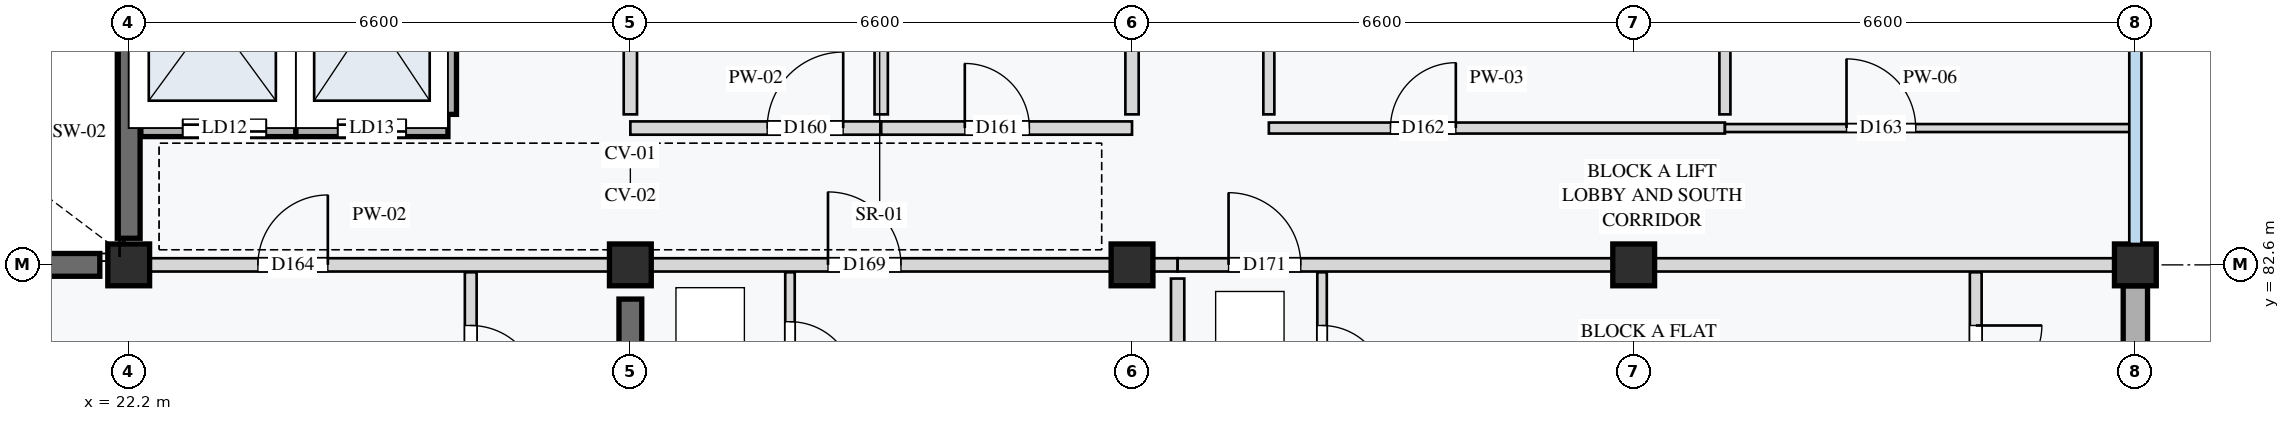
"""IFC4 building model, lengths in metres.
Left out: names, types, materials, properties, quantities, classifications, styles, units other than length and angle.
Written with IfcOpenShell. Run it as: python <this file> out.ifc"""

import sys

from ifc_helpers import new_model, si_unit, direction, frame, frame_2d, origin, origin_2d, place, context, subcontext, project, spatial, rectangle, extrude, element, fill, save


model = new_model("IFC4")
c1 = context("Model", 3, precision=1e-05, world=origin(), true_north=direction((0.0, 1.0)))
c2 = subcontext(c1, "Body", "Model", "MODEL_VIEW")
j1 = project(units=[si_unit("LENGTHUNIT", "METRE"), si_unit("PLANEANGLEUNIT", "RADIAN")], contexts=[c1])
p1 = place(None, origin())
s1 = spatial("IfcSite", under=j1, at=p1, CompositionType="ELEMENT")
p2 = place(p1, origin())
s2 = spatial("IfcBuilding", under=s1, at=p2, CompositionType="ELEMENT")
p3 = place(p2, frame((0.0, 0.0, 18.0)))
s3 = spatial("IfcBuildingStorey", under=s2, at=p3, CompositionType="ELEMENT", Elevation=18.0)
for number, where, z_axis, x_axis in (
    (1, (22.2, 82.6, 0.0), (0.0, 0.0, 1.0), (1.0, 0.0, 0.0)),
    (2, (28.8, 82.6, 0.0), (0.0, 0.0, 1.0), (1.0, 0.0, 0.0)),
    (3, (35.4, 82.6, 0.0), (0.0, 0.0, 1.0), (1.0, 0.0, 0.0)),
    (4, (42.0, 82.6, 0.0), (0.0, 0.0, 1.0), (1.0, 0.0, 0.0)),
    (5, (48.6, 82.6, 0.0), (0.0, 0.0, 1.0), (1.0, 0.0, 0.0)),
):
    element("IfcColumn", number, at=place(p3, frame(where, z_axis=z_axis, x_axis=x_axis)), inside=s3, PredefinedType="COLUMN", context=c2, shape_type="SweptSolid", body=[
        extrude(rectangle(XDim=0.55, YDim=0.55, at=origin_2d()), origin(), (0.0, 0.0, 1.0), 3.2),
    ])
p4 = place(p3, frame((15.98, 82.6, 0.0), z_axis=(0.0, 0.0, 1.0), x_axis=(1.0, 0.0, 0.0)))
e6 = element("IfcWall", 6, at=p4, inside=s3, PredefinedType="SHEAR", context=c2, shape_type="SweptSolid", body=[
    extrude(rectangle(XDim=5.84, YDim=0.3, at=frame_2d((2.92, 0.0))), origin(), (0.0, 0.0, 1.0), 2.96),
])
p5 = place(p3, frame((22.2, 82.95, 0.0), z_axis=(0.0, 0.0, 1.0), x_axis=(0.0, 1.0, 0.0)))
e7 = element("IfcWall", 7, at=p5, inside=s3, PredefinedType="SHEAR", context=c2, shape_type="SweptSolid", body=[
    extrude(rectangle(XDim=2.8, YDim=0.3, at=frame_2d((1.4, 0.0))), origin(), (0.0, 0.0, 1.0), 2.96),
])
p6 = place(p3, frame((28.8, 76.45, 0.0), z_axis=(0.0, 0.0, 1.0), x_axis=(0.0, 1.0, 0.0)))
e8 = element("IfcWall", 8, at=p6, inside=s3, PredefinedType="SHEAR", context=c2, shape_type="SweptSolid", body=[
    extrude(rectangle(XDim=5.7, YDim=0.3, at=frame_2d((2.85, 0.0))), origin(), (0.0, 0.0, 1.0), 2.96),
])
p7 = place(p3, frame((48.6, 76.275, 0.0), z_axis=(0.0, 0.0, 1.0), x_axis=(0.0, 1.0, 0.0)))
e9 = element("IfcWall", 9, at=p7, inside=s3, PredefinedType="STANDARD", context=c2, shape_type="SweptSolid", body=[
    extrude(rectangle(XDim=6.05, YDim=0.32, at=frame_2d((3.025, 0.0))), origin(), (0.0, 0.0, 1.0), 2.65),
])
p8 = place(p3, frame((22.36, 84.4, 0.0), z_axis=(0.0, 0.0, 1.0), x_axis=(1.0, 0.0, 0.0)))
e10 = element("IfcWall", 10, at=p8, inside=s3, PredefinedType="STANDARD", context=c2, shape_type="SweptSolid", body=[
    extrude(rectangle(XDim=2.04, YDim=0.225, at=frame_2d((1.02, 0.0))), origin(), (0.0, 0.0, 1.0), 2.96),
])
p9 = place(p8, frame((0.55, 0.0, 0.0)))
e11 = element("IfcOpeningElement", 11, at=p9, cuts=e10, PredefinedType="OPENING", context=c2, shape_type="SweptSolid", body=[
    extrude(rectangle(XDim=1.1, YDim=2.1, at=frame_2d((0.55, 1.05))), frame((0.0, 0.123, 0.0), z_axis=(0.0, -1.0, 0.0), x_axis=(1.0, 0.0, 0.0)), (0.0, 0.0, 1.0), 0.245),
])
p10 = place(p3, frame((24.4, 84.4, 0.0), z_axis=(0.0, 0.0, 1.0), x_axis=(1.0, 0.0, 0.0)))
e12 = element("IfcWall", 12, at=p10, inside=s3, PredefinedType="STANDARD", context=c2, shape_type="SweptSolid", body=[
    extrude(rectangle(XDim=2.0, YDim=0.225, at=frame_2d((1.0, 0.0))), origin(), (0.0, 0.0, 1.0), 2.96),
])
p11 = place(p10, frame((0.55, 0.0, 0.0)))
e13 = element("IfcOpeningElement", 13, at=p11, cuts=e12, PredefinedType="OPENING", context=c2, shape_type="SweptSolid", body=[
    extrude(rectangle(XDim=0.9, YDim=2.1, at=frame_2d((0.45, 1.05))), frame((0.0, 0.123, 0.0), z_axis=(0.0, -1.0, 0.0), x_axis=(1.0, 0.0, 0.0)), (0.0, 0.0, 1.0), 0.245),
])
for number, where, z_axis, x_axis in (
    (14, (24.4, 84.58, 0.0), (0.0, 0.0, 1.0), (0.0, 1.0, 0.0)),
    (15, (26.4, 84.58, 0.0), (0.0, 0.0, 1.0), (0.0, 1.0, 0.0)),
):
    element("IfcWall", number, at=place(p3, frame(where, z_axis=z_axis, x_axis=x_axis)), inside=s3, PredefinedType="STANDARD", context=c2, shape_type="SweptSolid", body=[
        extrude(rectangle(XDim=2.64, YDim=0.225, at=frame_2d((1.32, 0.0))), origin(), (0.0, 0.0, 1.0), 2.96),
    ])
p12 = place(p3, frame((28.8, 84.4, 0.0), z_axis=(0.0, 0.0, 1.0), x_axis=(1.0, 0.0, 0.0)))
e16 = element("IfcWall", 16, at=p12, inside=s3, PredefinedType="PARTITIONING", context=c2, shape_type="SweptSolid", body=[
    extrude(rectangle(XDim=3.3, YDim=0.175, at=frame_2d((1.65, 0.0))), origin(), (0.0, 0.0, 1.0), 2.96),
])
p13 = place(p12, frame((1.8, 0.0, 0.0)))
e17 = element("IfcOpeningElement", 17, at=p13, cuts=e16, PredefinedType="OPENING", context=c2, shape_type="SweptSolid", body=[
    extrude(rectangle(XDim=1.0, YDim=2.16, at=frame_2d((0.5, 1.08))), frame((0.0, 0.097, 0.0), z_axis=(0.0, -1.0, 0.0), x_axis=(1.0, 0.0, 0.0)), (0.0, 0.0, 1.0), 0.195),
])
p14 = place(p3, frame((32.1, 84.4, 0.0), z_axis=(0.0, 0.0, 1.0), x_axis=(1.0, 0.0, 0.0)))
e18 = element("IfcWall", 18, at=p14, inside=s3, PredefinedType="PARTITIONING", context=c2, shape_type="SweptSolid", body=[
    extrude(rectangle(XDim=3.3, YDim=0.175, at=frame_2d((1.65, 0.0))), origin(), (0.0, 0.0, 1.0), 2.96),
])
p15 = place(p14, frame((1.1, 0.0, 0.0)))
e19 = element("IfcOpeningElement", 19, at=p15, cuts=e18, PredefinedType="OPENING", context=c2, shape_type="SweptSolid", body=[
    extrude(rectangle(XDim=0.85, YDim=2.0, at=frame_2d((0.425, 1.0))), frame((0.0, 0.097, 0.0), z_axis=(0.0, -1.0, 0.0), x_axis=(1.0, 0.0, 0.0)), (0.0, 0.0, 1.0), 0.195),
])
for number, where, z_axis, x_axis in (
    (20, (28.8, 84.58, 0.0), (0.0, 0.0, 1.0), (0.0, 1.0, 0.0)),
    (21, (32.1, 84.58, 0.0), (0.0, 0.0, 1.0), (0.0, 1.0, 0.0)),
    (22, (35.4, 84.58, 0.0), (0.0, 0.0, 1.0), (0.0, 1.0, 0.0)),
):
    element("IfcWall", number, at=place(p3, frame(where, z_axis=z_axis, x_axis=x_axis)), inside=s3, PredefinedType="PARTITIONING", context=c2, shape_type="SweptSolid", body=[
        extrude(rectangle(XDim=1.14, YDim=0.175, at=frame_2d((0.57, 0.0))), origin(), (0.0, 0.0, 1.0), 2.96),
    ])
p16 = place(p3, frame((37.2, 84.4, 0.0), z_axis=(0.0, 0.0, 1.0), x_axis=(1.0, 0.0, 0.0)))
e23 = element("IfcWall", 23, at=p16, inside=s3, PredefinedType="PARTITIONING", context=c2, shape_type="SweptSolid", body=[
    extrude(rectangle(XDim=6.0, YDim=0.145, at=frame_2d((3.0, 0.0))), origin(), (0.0, 0.0, 1.0), 2.96),
])
p17 = place(p16, frame((1.6, 0.0, 0.0)))
e24 = element("IfcOpeningElement", 24, at=p17, cuts=e23, PredefinedType="OPENING", context=c2, shape_type="SweptSolid", body=[
    extrude(rectangle(XDim=0.86, YDim=2.12, at=frame_2d((0.43, 1.06))), frame((0.0, 0.083, 0.0), z_axis=(0.0, -1.0, 0.0), x_axis=(1.0, 0.0, 0.0)), (0.0, 0.0, 1.0), 0.165),
])
p18 = place(p3, frame((43.2, 84.4, 0.0), z_axis=(0.0, 0.0, 1.0), x_axis=(1.0, 0.0, 0.0)))
e25 = element("IfcWall", 25, at=p18, inside=s3, PredefinedType="PARTITIONING", context=c2, shape_type="SweptSolid", body=[
    extrude(rectangle(XDim=5.4, YDim=0.105, at=frame_2d((2.7, 0.0))), origin(), (0.0, 0.0, 1.0), 2.96),
])
p19 = place(p18, frame((1.6, 0.0, 0.0)))
e26 = element("IfcOpeningElement", 26, at=p19, cuts=e25, PredefinedType="OPENING", context=c2, shape_type="SweptSolid", body=[
    extrude(rectangle(XDim=0.91, YDim=2.14, at=frame_2d((0.455, 1.07))), frame((0.0, 0.062, 0.0), z_axis=(0.0, -1.0, 0.0), x_axis=(1.0, 0.0, 0.0)), (0.0, 0.0, 1.0), 0.125),
])
for number, where, z_axis, x_axis in (
    (27, (43.2, 84.58, 0.0), (0.0, 0.0, 1.0), (0.0, 1.0, 0.0)),
    (28, (37.2, 84.58, 0.0), (0.0, 0.0, 1.0), (0.0, 1.0, 0.0)),
):
    element("IfcWall", number, at=place(p3, frame(where, z_axis=z_axis, x_axis=x_axis)), inside=s3, PredefinedType="PARTITIONING", context=c2, shape_type="SweptSolid", body=[
        extrude(rectangle(XDim=2.64, YDim=0.145, at=frame_2d((1.32, 0.0))), origin(), (0.0, 0.0, 1.0), 2.96),
    ])
p20 = place(p3, frame((22.2, 82.6, 0.0), z_axis=(0.0, 0.0, 1.0), x_axis=(1.0, 0.0, 0.0)))
e29 = element("IfcWall", 29, at=p20, inside=s3, PredefinedType="PARTITIONING", context=c2, shape_type="SweptSolid", body=[
    extrude(rectangle(XDim=6.6, YDim=0.175, at=frame_2d((3.3, 0.0))), origin(), (0.0, 0.0, 1.0), 2.55),
])
p21 = place(p20, frame((1.7, 0.0, 0.0)))
e30 = element("IfcOpeningElement", 30, at=p21, cuts=e29, PredefinedType="OPENING", context=c2, shape_type="SweptSolid", body=[
    extrude(rectangle(XDim=0.92, YDim=2.14, at=frame_2d((0.46, 1.07))), frame((0.0, 0.097, 0.0), z_axis=(0.0, -1.0, 0.0), x_axis=(1.0, 0.0, 0.0)), (0.0, 0.0, 1.0), 0.195),
])
p22 = place(p3, frame((26.7, 82.502, 0.0), z_axis=(0.0, 0.0, 1.0), x_axis=(0.0, -1.0, 0.0)))
e31 = element("IfcWall", 31, at=p22, inside=s3, PredefinedType="PARTITIONING", context=c2, shape_type="SweptSolid", body=[
    extrude(rectangle(XDim=2.302, YDim=0.155, at=frame_2d((1.151, 0.0))), origin(), (0.0, 0.0, 1.0), 2.96),
])
p23 = place(p22, frame((0.7, 0.0, 0.0)))
e32 = element("IfcOpeningElement", 32, at=p23, cuts=e31, PredefinedType="OPENING", context=c2, shape_type="SweptSolid", body=[
    extrude(rectangle(XDim=0.9, YDim=2.1, at=frame_2d((0.45, 1.05))), frame((0.0, 0.087, 0.0), z_axis=(0.0, -1.0, 0.0), x_axis=(1.0, 0.0, 0.0)), (0.0, 0.0, 1.0), 0.175),
])
p24 = place(p3, frame((28.8, 82.6, 0.0), z_axis=(0.0, 0.0, 1.0), x_axis=(1.0, 0.0, 0.0)))
e33 = element("IfcWall", 33, at=p24, inside=s3, PredefinedType="PARTITIONING", context=c2, shape_type="SweptSolid", body=[
    extrude(rectangle(XDim=7.2, YDim=0.175, at=frame_2d((3.6, 0.0))), origin(), (0.0, 0.0, 1.0), 2.55),
])
p25 = place(p24, frame((2.6, 0.0, 0.0)))
e34 = element("IfcOpeningElement", 34, at=p25, cuts=e33, PredefinedType="OPENING", context=c2, shape_type="SweptSolid", body=[
    extrude(rectangle(XDim=0.96, YDim=2.18, at=frame_2d((0.48, 1.09))), frame((0.0, 0.097, 0.0), z_axis=(0.0, -1.0, 0.0), x_axis=(1.0, 0.0, 0.0)), (0.0, 0.0, 1.0), 0.195),
])
p26 = place(p3, frame((30.9, 82.502, 0.0), z_axis=(0.0, 0.0, 1.0), x_axis=(0.0, -1.0, 0.0)))
e35 = element("IfcWall", 35, at=p26, inside=s3, PredefinedType="PARTITIONING", context=c2, shape_type="SweptSolid", body=[
    extrude(rectangle(XDim=2.202, YDim=0.125, at=frame_2d((1.101, 0.0))), origin(), (0.0, 0.0, 1.0), 2.96),
])
p27 = place(p26, frame((0.65, 0.0, 0.0)))
e36 = element("IfcOpeningElement", 36, at=p27, cuts=e35, PredefinedType="OPENING", context=c2, shape_type="SweptSolid", body=[
    extrude(rectangle(XDim=0.85, YDim=2.04, at=frame_2d((0.425, 1.02))), frame((0.0, 0.073, 0.0), z_axis=(0.0, -1.0, 0.0), x_axis=(1.0, 0.0, 0.0)), (0.0, 0.0, 1.0), 0.145),
])
p28 = place(p3, frame((36.0, 82.42, 0.0), z_axis=(0.0, 0.0, 1.0), x_axis=(0.0, -1.0, 0.0)))
e37 = element("IfcWall", 37, at=p28, inside=s3, PredefinedType="PARTITIONING", context=c2, shape_type="SweptSolid", body=[
    extrude(rectangle(XDim=6.19, YDim=0.175, at=frame_2d((3.095, 0.0))), origin(), (0.0, 0.0, 1.0), 2.96),
])
p29 = place(p3, frame((36.0, 82.6, 0.0), z_axis=(0.0, 0.0, 1.0), x_axis=(1.0, 0.0, 0.0)))
e38 = element("IfcWall", 38, at=p29, inside=s3, PredefinedType="PARTITIONING", context=c2, shape_type="SweptSolid", body=[
    extrude(rectangle(XDim=12.6, YDim=0.175, at=frame_2d((6.3, 0.0))), origin(), (0.0, 0.0, 1.0), 2.55),
])
p30 = place(p29, frame((0.67, 0.0, 0.0)))
e39 = element("IfcOpeningElement", 39, at=p30, cuts=e38, PredefinedType="OPENING", context=c2, shape_type="SweptSolid", body=[
    extrude(rectangle(XDim=0.95, YDim=2.16, at=frame_2d((0.475, 1.08))), frame((0.0, 0.097, 0.0), z_axis=(0.0, -1.0, 0.0), x_axis=(1.0, 0.0, 0.0)), (0.0, 0.0, 1.0), 0.195),
])
p31 = place(p3, frame((37.9, 82.502, 0.0), z_axis=(0.0, 0.0, 1.0), x_axis=(0.0, -1.0, 0.0)))
e40 = element("IfcWall", 40, at=p31, inside=s3, PredefinedType="PARTITIONING", context=c2, shape_type="SweptSolid", body=[
    extrude(rectangle(XDim=2.302, YDim=0.125, at=frame_2d((1.151, 0.0))), origin(), (0.0, 0.0, 1.0), 2.96),
])
p32 = place(p31, frame((0.7, 0.0, 0.0)))
e41 = element("IfcOpeningElement", 41, at=p32, cuts=e40, PredefinedType="OPENING", context=c2, shape_type="SweptSolid", body=[
    extrude(rectangle(XDim=0.84, YDim=2.06, at=frame_2d((0.42, 1.03))), frame((0.0, 0.073, 0.0), z_axis=(0.0, -1.0, 0.0), x_axis=(1.0, 0.0, 0.0)), (0.0, 0.0, 1.0), 0.145),
])
p33 = place(p3, frame((46.5, 82.502, 0.0), z_axis=(0.0, 0.0, 1.0), x_axis=(0.0, -1.0, 0.0)))
e42 = element("IfcWall", 42, at=p33, inside=s3, PredefinedType="PARTITIONING", context=c2, shape_type="SweptSolid", body=[
    extrude(rectangle(XDim=2.302, YDim=0.155, at=frame_2d((1.151, 0.0))), origin(), (0.0, 0.0, 1.0), 2.96),
])
p34 = place(p33, frame((0.7, 0.0, 0.0)))
e43 = element("IfcOpeningElement", 43, at=p34, cuts=e42, PredefinedType="OPENING", context=c2, shape_type="SweptSolid", body=[
    extrude(rectangle(XDim=0.87, YDim=2.08, at=frame_2d((0.435, 1.04))), frame((0.0, 0.087, 0.0), z_axis=(0.0, -1.0, 0.0), x_axis=(1.0, 0.0, 0.0)), (0.0, 0.0, 1.0), 0.175),
])
p35 = place(p9, origin())
e44 = element("IfcDoor", 44, at=p35, inside=s3, OperationType="DOUBLE_DOOR_SLIDING", PredefinedType="DOOR", context=c2, shape_type="SweptSolid", body=[
    extrude(rectangle(XDim=1.1, YDim=2.1, at=frame_2d((0.55, 1.05))), frame((0.0, 0.025, 0.0), z_axis=(0.0, -1.0, 0.0), x_axis=(1.0, 0.0, 0.0)), (0.0, 0.0, 1.0), 0.05),
])
fill(e11, e44)
p36 = place(p11, origin())
e45 = element("IfcDoor", 45, at=p36, inside=s3, OperationType="DOUBLE_DOOR_SLIDING", PredefinedType="DOOR", context=c2, shape_type="SweptSolid", body=[
    extrude(rectangle(XDim=0.9, YDim=2.1, at=frame_2d((0.45, 1.05))), frame((0.0, 0.025, 0.0), z_axis=(0.0, -1.0, 0.0), x_axis=(1.0, 0.0, 0.0)), (0.0, 0.0, 1.0), 0.05),
])
fill(e13, e45)
p37 = place(p13, origin())
e46 = element("IfcDoor", 46, at=p37, inside=s3, OperationType="SINGLE_SWING_RIGHT", PredefinedType="DOOR", context=c2, shape_type="SweptSolid", body=[
    extrude(rectangle(XDim=1.0, YDim=2.16, at=frame_2d((0.5, 1.08))), frame((0.0, 0.025, 0.0), z_axis=(0.0, -1.0, 0.0), x_axis=(1.0, 0.0, 0.0)), (0.0, 0.0, 1.0), 0.05),
])
fill(e17, e46)
p38 = place(p15, origin())
e47 = element("IfcDoor", 47, at=p38, inside=s3, OperationType="SINGLE_SWING_LEFT", PredefinedType="DOOR", context=c2, shape_type="SweptSolid", body=[
    extrude(rectangle(XDim=0.85, YDim=2.0, at=frame_2d((0.425, 1.0))), frame((0.0, 0.025, 0.0), z_axis=(0.0, -1.0, 0.0), x_axis=(1.0, 0.0, 0.0)), (0.0, 0.0, 1.0), 0.05),
])
fill(e19, e47)
p39 = place(p17, origin())
e48 = element("IfcDoor", 48, at=p39, inside=s3, OperationType="SINGLE_SWING_RIGHT", PredefinedType="DOOR", context=c2, shape_type="SweptSolid", body=[
    extrude(rectangle(XDim=0.86, YDim=2.12, at=frame_2d((0.43, 1.06))), frame((0.0, 0.025, 0.0), z_axis=(0.0, -1.0, 0.0), x_axis=(1.0, 0.0, 0.0)), (0.0, 0.0, 1.0), 0.05),
])
fill(e24, e48)
p40 = place(p19, origin())
e49 = element("IfcDoor", 49, at=p40, inside=s3, OperationType="SINGLE_SWING_LEFT", PredefinedType="DOOR", context=c2, shape_type="SweptSolid", body=[
    extrude(rectangle(XDim=0.91, YDim=2.14, at=frame_2d((0.455, 1.07))), frame((0.0, 0.025, 0.0), z_axis=(0.0, -1.0, 0.0), x_axis=(1.0, 0.0, 0.0)), (0.0, 0.0, 1.0), 0.05),
])
fill(e26, e49)
p41 = place(p21, origin())
e50 = element("IfcDoor", 50, at=p41, inside=s3, OperationType="SINGLE_SWING_RIGHT", PredefinedType="DOOR", context=c2, shape_type="SweptSolid", body=[
    extrude(rectangle(XDim=0.92, YDim=2.14, at=frame_2d((0.46, 1.07))), frame((0.0, 0.025, 0.0), z_axis=(0.0, -1.0, 0.0), x_axis=(1.0, 0.0, 0.0)), (0.0, 0.0, 1.0), 0.05),
])
fill(e30, e50)
p42 = place(p23, origin())
e51 = element("IfcDoor", 51, at=p42, inside=s3, OperationType="SINGLE_SWING_RIGHT", PredefinedType="DOOR", context=c2, shape_type="SweptSolid", body=[
    extrude(rectangle(XDim=0.9, YDim=2.1, at=frame_2d((0.45, 1.05))), frame((0.0, 0.025, 0.0), z_axis=(0.0, -1.0, 0.0), x_axis=(1.0, 0.0, 0.0)), (0.0, 0.0, 1.0), 0.05),
])
fill(e32, e51)
p43 = place(p25, origin())
e52 = element("IfcDoor", 52, at=p43, inside=s3, OperationType="SINGLE_SWING_LEFT", PredefinedType="DOOR", context=c2, shape_type="SweptSolid", body=[
    extrude(rectangle(XDim=0.96, YDim=2.18, at=frame_2d((0.48, 1.09))), frame((0.0, 0.025, 0.0), z_axis=(0.0, -1.0, 0.0), x_axis=(1.0, 0.0, 0.0)), (0.0, 0.0, 1.0), 0.05),
])
fill(e34, e52)
p44 = place(p27, origin())
e53 = element("IfcDoor", 53, at=p44, inside=s3, OperationType="SINGLE_SWING_RIGHT", PredefinedType="DOOR", context=c2, shape_type="SweptSolid", body=[
    extrude(rectangle(XDim=0.85, YDim=2.04, at=frame_2d((0.425, 1.02))), frame((0.0, 0.025, 0.0), z_axis=(0.0, -1.0, 0.0), x_axis=(1.0, 0.0, 0.0)), (0.0, 0.0, 1.0), 0.05),
])
fill(e36, e53)
p45 = place(p30, origin())
e54 = element("IfcDoor", 54, at=p45, inside=s3, OperationType="SINGLE_SWING_LEFT", PredefinedType="DOOR", context=c2, shape_type="SweptSolid", body=[
    extrude(rectangle(XDim=0.95, YDim=2.16, at=frame_2d((0.475, 1.08))), frame((0.0, 0.025, 0.0), z_axis=(0.0, -1.0, 0.0), x_axis=(1.0, 0.0, 0.0)), (0.0, 0.0, 1.0), 0.05),
])
fill(e39, e54)
p46 = place(p32, origin())
e55 = element("IfcDoor", 55, at=p46, inside=s3, OperationType="SINGLE_SWING_RIGHT", PredefinedType="DOOR", context=c2, shape_type="SweptSolid", body=[
    extrude(rectangle(XDim=0.84, YDim=2.06, at=frame_2d((0.42, 1.03))), frame((0.0, 0.025, 0.0), z_axis=(0.0, -1.0, 0.0), x_axis=(1.0, 0.0, 0.0)), (0.0, 0.0, 1.0), 0.05),
])
fill(e41, e55)
p47 = place(p34, origin())
e56 = element("IfcDoor", 56, at=p47, inside=s3, OperationType="SINGLE_SWING_LEFT", PredefinedType="DOOR", context=c2, shape_type="SweptSolid", body=[
    extrude(rectangle(XDim=0.87, YDim=2.08, at=frame_2d((0.435, 1.04))), frame((0.0, 0.025, 0.0), z_axis=(0.0, -1.0, 0.0), x_axis=(1.0, 0.0, 0.0)), (0.0, 0.0, 1.0), 0.05),
])
fill(e43, e56)
save(model, sys.argv[1])
